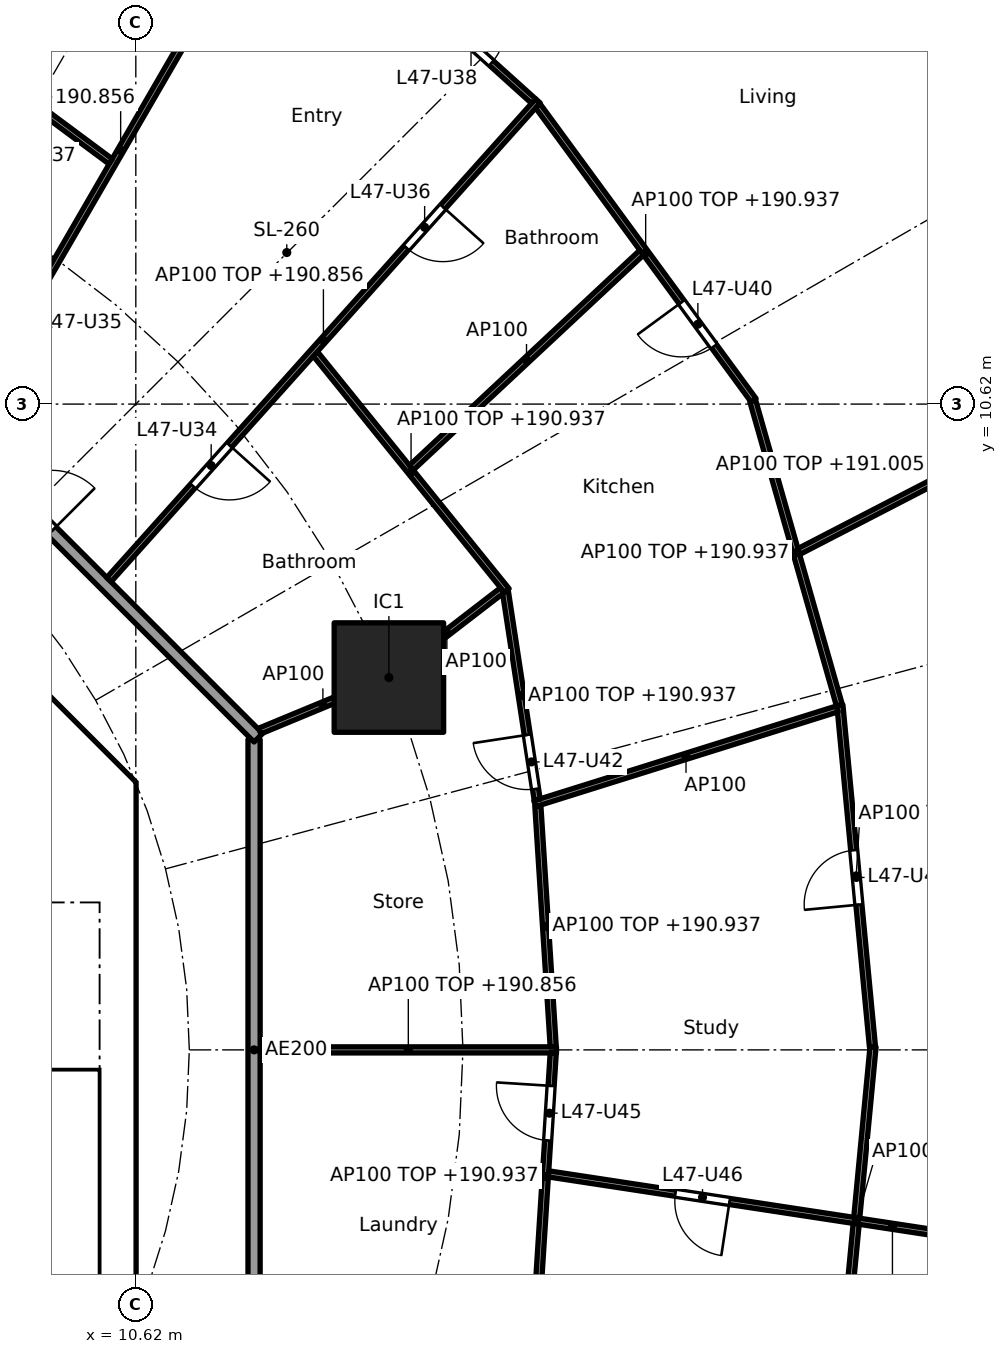
"""IFC4 building model, lengths in metres.
Left out: names, types, materials, properties, quantities, classifications, styles, units other than length and angle.
Written with IfcOpenShell. Run it as: python <this file> out.ifc"""

import sys

from ifc_helpers import new_model, si_unit, direction, frame, frame_2d, origin, origin_2d, place, context, subcontext, project, spatial, polyline, rectangle, outline, extrude, element, fill, save


model = new_model("IFC4")
c1 = context("Model", 3, precision=1e-05, world=origin(), true_north=direction((0.0, 1.0)))
c2 = subcontext(c1, "Body", "Model", "MODEL_VIEW")
j1 = project(units=[si_unit("LENGTHUNIT", "METRE"), si_unit("PLANEANGLEUNIT", "RADIAN")], contexts=[c1])
p1 = place(None, origin())
s1 = spatial("IfcSite", under=j1, at=p1, CompositionType="ELEMENT")
p2 = place(p1, origin())
s2 = spatial("IfcBuilding", under=s1, at=p2, CompositionType="ELEMENT")
p3 = place(p2, frame((0.0, 0.0, 188.1)))
s3 = spatial("IfcBuildingStorey", under=s2, at=p3, CompositionType="ELEMENT", Elevation=188.1)
p4 = place(p3, frame((14.782, 6.123, 0.0), z_axis=(0.0, 0.0, 1.0), x_axis=(1.0, 0.0, 0.0)))
e1 = element("IfcColumn", 1, at=p4, inside=s3, PredefinedType="COLUMN", context=c2, shape_type="SweptSolid", body=[
    extrude(rectangle(XDim=1.8, YDim=1.8, at=origin_2d()), origin(), (0.0, 0.0, 1.0), 3.7),
])
p5 = place(p3, frame((9.988, 4.613, 0.0), z_axis=(0.0, 0.0, 1.0), x_axis=(-0.707106781187, 0.707106781187, 0.0)))
e2 = element("IfcWall", 2, at=p5, inside=s3, PredefinedType="SHEAR", context=c2, shape_type="SweptSolid", body=[
    extrude(rectangle(XDim=7.602, YDim=0.6, at=frame_2d((3.801, 0.0))), origin(), (0.0, 0.0, 1.0), 3.44),
])
p6 = place(p5, frame((3.201, 0.0, 0.0)))
e3 = element("IfcOpeningElement", 3, at=p6, cuts=e2, PredefinedType="OPENING", context=c2, shape_type="SweptSolid", body=[
    extrude(rectangle(XDim=1.2, YDim=2.1, at=frame_2d((0.6, 1.05))), frame((0.0, 0.31, 0.0), z_axis=(0.0, -1.0, 0.0), x_axis=(1.0, 0.0, 0.0)), (0.0, 0.0, 1.0), 0.62),
])
p7 = place(p3, frame((6.7, 4.0, 0.0), z_axis=(0.0, 0.0, 1.0), x_axis=(1.0, 0.0, 0.0)))
e4 = element("IfcWall", 4, at=p7, inside=s3, PredefinedType="SOLIDWALL", context=c2, shape_type="SweptSolid", body=[
    extrude(rectangle(XDim=3.325, YDim=0.2, at=frame_2d((1.662, 0.0))), origin(), (0.0, 0.0, 1.0), 3.44),
])
p8 = place(p7, frame((1.25, 0.0, 0.0)))
e5 = element("IfcOpeningElement", 5, at=p8, cuts=e4, PredefinedType="OPENING", context=c2, shape_type="SweptSolid", body=[
    extrude(rectangle(XDim=1.1, YDim=2.1, at=frame_2d((0.55, 1.05))), frame((0.0, 0.11, 0.0), z_axis=(0.0, -1.0, 0.0), x_axis=(1.0, 0.0, 0.0)), (0.0, 0.0, 1.0), 0.22),
])
p9 = place(p3, origin())
e6 = element("IfcWall", 6, at=p9, inside=s3, PredefinedType="SHEAR", context=c2, shape_type="SweptSolid", body=[
    extrude(outline(polyline([(9.776, -4.401), (10.025, -4.152), (10.025, -3.801), (10.025, 4.152), (9.776, 4.401), (10.2, 4.825), (10.625, 4.401), (10.625, -4.401), (10.2, -4.825), (9.776, -4.401)])), origin(), (0.0, 0.0, 1.0), 3.44),
])
p10 = place(p3, frame((6.138, 14.83, 0.0), z_axis=(0.0, 0.0, 1.0), x_axis=(0.294818517221, 0.955553264818, 0.0)))
e7 = element("IfcWall", 7, at=p10, inside=s3, PredefinedType="PARTITIONING", context=c2, shape_type="SweptSolid", body=[
    extrude(rectangle(XDim=12.619, YDim=0.2, at=frame_2d((6.31, 0.0))), origin(), (0.0, 0.0, 1.0), 2.837),
])
p11 = place(p3, frame((12.565, -5.104, 0.0), z_axis=(0.0, 0.0, 1.0), x_axis=(0.0, 1.0, 0.0)))
e8 = element("IfcWall", 8, at=p11, inside=s3, PredefinedType="PARTITIONING", context=c2, shape_type="SweptSolid", body=[
    extrude(rectangle(XDim=10.209, YDim=0.2, at=frame_2d((5.104, 0.0))), origin(), (0.0, 0.0, 1.0), 3.44),
])
p12 = place(p3, frame((12.635, 5.134, 0.0), z_axis=(0.0, 0.0, 1.0), x_axis=(-0.707106781187, 0.707106781187, 0.0)))
e9 = element("IfcWall", 9, at=p12, inside=s3, PredefinedType="PARTITIONING", context=c2, shape_type="SweptSolid", body=[
    extrude(rectangle(XDim=10.609, YDim=0.2, at=frame_2d((5.305, 0.0))), origin(), (0.0, 0.0, 1.0), 3.44),
])
p13 = place(p12, frame((4.804, 0.0, 0.0)))
e10 = element("IfcOpeningElement", 10, at=p13, cuts=e9, PredefinedType="OPENING", context=c2, shape_type="SweptSolid", body=[
    extrude(rectangle(XDim=1.0, YDim=2.1, at=frame_2d((0.5, 1.05))), frame((0.0, 0.11, 0.0), z_axis=(0.0, -1.0, 0.0), x_axis=(1.0, 0.0, 0.0)), (0.0, 0.0, 1.0), 0.22),
])
p14 = place(p3, frame((12.665, 0.0, 0.0), z_axis=(0.0, 0.0, 1.0), x_axis=(1.0, 0.0, 0.0)))
e11 = element("IfcWall", 11, at=p14, inside=s3, PredefinedType="PARTITIONING", context=c2, shape_type="SweptSolid", body=[
    extrude(rectangle(XDim=4.873, YDim=0.1, at=frame_2d((2.437, 0.0))), origin(), (0.0, 0.0, 1.0), 2.756),
])
p15 = place(p3, frame((17.485, 0.05, 0.0), z_axis=(0.0, 0.0, 1.0), x_axis=(-0.063679314345, 0.99797041285, 0.0)))
e12 = element("IfcWall", 12, at=p15, inside=s3, PredefinedType="PARTITIONING", context=c2, shape_type="SweptSolid", body=[
    extrude(rectangle(XDim=3.972, YDim=0.1, at=frame_2d((1.986, 0.0))), origin(), (0.0, 0.0, 1.0), 2.837),
])
p16 = place(p3, frame((17.485, -0.05, 0.0), z_axis=(0.0, 0.0, 1.0), x_axis=(-0.063673473968, -0.997970785501, 0.0)))
e13 = element("IfcWall", 13, at=p16, inside=s3, PredefinedType="PARTITIONING", context=c2, shape_type="SweptSolid", body=[
    extrude(rectangle(XDim=4.072, YDim=0.1, at=frame_2d((2.036, 0.0))), origin(), (0.0, 0.0, 1.0), 2.837),
])
p17 = place(p16, frame((0.543, 0.0, 0.0)))
e14 = element("IfcOpeningElement", 14, at=p17, cuts=e13, PredefinedType="OPENING", context=c2, shape_type="SweptSolid", body=[
    extrude(rectangle(XDim=0.9, YDim=2.1, at=frame_2d((0.45, 1.05))), frame((0.0, 0.06, 0.0), z_axis=(0.0, -1.0, 0.0), x_axis=(1.0, 0.0, 0.0)), (0.0, 0.0, 1.0), 0.12),
])
p18 = place(p3, frame((22.734, 0.05, 0.0), z_axis=(0.0, 0.0, 1.0), x_axis=(-0.0949274088, 0.995484197292, 0.0)))
e15 = element("IfcWall", 15, at=p18, inside=s3, PredefinedType="PARTITIONING", context=c2, shape_type="SweptSolid", body=[
    extrude(rectangle(XDim=5.648, YDim=0.1, at=frame_2d((2.824, 0.0))), origin(), (0.0, 0.0, 1.0), 2.837),
])
p19 = place(p18, frame((2.349, 0.0, 0.0)))
e16 = element("IfcOpeningElement", 16, at=p19, cuts=e15, PredefinedType="OPENING", context=c2, shape_type="SweptSolid", body=[
    extrude(rectangle(XDim=0.9, YDim=2.1, at=frame_2d((0.45, 1.05))), frame((0.0, 0.06, 0.0), z_axis=(0.0, -1.0, 0.0), x_axis=(1.0, 0.0, 0.0)), (0.0, 0.0, 1.0), 0.12),
])
p20 = place(p3, frame((22.744, 0.05, 0.0), z_axis=(0.0, 0.0, 1.0), x_axis=(-0.094931362305, -0.995483820286, 0.0)))
e17 = element("IfcWall", 17, at=p20, inside=s3, PredefinedType="PARTITIONING", context=c2, shape_type="SweptSolid", body=[
    extrude(rectangle(XDim=5.748, YDim=0.1, at=frame_2d((2.874, 0.0))), origin(), (0.0, 0.0, 1.0), 2.837),
])
p21 = place(p3, frame((17.181, 4.049, 0.0), z_axis=(0.0, 0.0, 1.0), x_axis=(0.954246359918, 0.299021545351, 0.0)))
e18 = element("IfcWall", 18, at=p21, inside=s3, PredefinedType="PARTITIONING", context=c2, shape_type="SweptSolid", body=[
    extrude(rectangle(XDim=5.213, YDim=0.1, at=frame_2d((2.606, 0.0))), origin(), (0.0, 0.0, 1.0), 3.44),
])
p22 = place(p3, frame((17.221, 4.113, 0.0), z_axis=(0.0, 0.0, 1.0), x_axis=(-0.151078880423, 0.988521710379, 0.0)))
e19 = element("IfcWall", 19, at=p22, inside=s3, PredefinedType="PARTITIONING", context=c2, shape_type="SweptSolid", body=[
    extrude(rectangle(XDim=3.469, YDim=0.1, at=frame_2d((1.735, 0.0))), origin(), (0.0, 0.0, 1.0), 2.837),
])
p23 = place(p22, frame((0.18, 0.0, 0.0)))
e20 = element("IfcOpeningElement", 20, at=p23, cuts=e19, PredefinedType="OPENING", context=c2, shape_type="SweptSolid", body=[
    extrude(rectangle(XDim=0.9, YDim=2.1, at=frame_2d((0.45, 1.05))), frame((0.0, 0.06, 0.0), z_axis=(0.0, -1.0, 0.0), x_axis=(1.0, 0.0, 0.0)), (0.0, 0.0, 1.0), 0.12),
])
p24 = place(p3, frame((22.189, 5.67, 0.0), z_axis=(0.0, 0.0, 1.0), x_axis=(-0.273815967041, 0.961782104322, 0.0)))
e21 = element("IfcWall", 21, at=p24, inside=s3, PredefinedType="PARTITIONING", context=c2, shape_type="SweptSolid", body=[
    extrude(rectangle(XDim=5.202, YDim=0.1, at=frame_2d((2.601, 0.0))), origin(), (0.0, 0.0, 1.0), 2.837),
])
p25 = place(p3, frame((21.522, 8.195, 0.0), z_axis=(0.0, 0.0, 1.0), x_axis=(0.888281046031, 0.459300319249, 0.0)))
e22 = element("IfcWall", 22, at=p25, inside=s3, PredefinedType="PARTITIONING", context=c2, shape_type="SweptSolid", body=[
    extrude(rectangle(XDim=6.176, YDim=0.1, at=frame_2d((3.088, 0.0))), origin(), (0.0, 0.0, 1.0), 2.905),
])
p26 = place(p25, frame((2.638, 0.0, 0.0)))
e23 = element("IfcOpeningElement", 23, at=p26, cuts=e22, PredefinedType="OPENING", context=c2, shape_type="SweptSolid", body=[
    extrude(rectangle(XDim=0.9, YDim=2.1, at=frame_2d((0.45, 1.05))), frame((0.0, 0.06, 0.0), z_axis=(0.0, -1.0, 0.0), x_axis=(1.0, 0.0, 0.0)), (0.0, 0.0, 1.0), 0.12),
])
p27 = place(p3, frame((12.657, 5.243, 0.0), z_axis=(0.0, 0.0, 1.0), x_axis=(0.923826362943, 0.382811769845, 0.0)))
e24 = element("IfcWall", 24, at=p27, inside=s3, PredefinedType="PARTITIONING", context=c2, shape_type="SweptSolid", body=[
    extrude(rectangle(XDim=2.25, YDim=0.1, at=frame_2d((1.125, 0.0))), origin(), (0.0, 0.0, 1.0), 3.44),
])
p28 = place(p3, frame((14.822, 6.154, 0.0), z_axis=(0.0, 0.0, 1.0), x_axis=(0.792226528082, 0.610227111987, 0.0)))
e25 = element("IfcWall", 25, at=p28, inside=s3, PredefinedType="PARTITIONING", context=c2, shape_type="SweptSolid", body=[
    extrude(rectangle(XDim=2.307, YDim=0.1, at=frame_2d((1.154, 0.0))), origin(), (0.0, 0.0, 1.0), 3.44),
])
p29 = place(p3, frame((16.721, 7.553, 0.0), z_axis=(0.0, 0.0, 1.0), x_axis=(-0.628753513808, 0.777604667472, 0.0)))
e26 = element("IfcWall", 26, at=p29, inside=s3, PredefinedType="PARTITIONING", context=c2, shape_type="SweptSolid", body=[
    extrude(rectangle(XDim=5.007, YDim=0.1, at=frame_2d((2.504, 0.0))), origin(), (0.0, 0.0, 1.0), 2.837),
])
p30 = place(p3, frame((20.781, 10.681, 0.0), z_axis=(0.0, 0.0, 1.0), x_axis=(-0.591117075283, 0.806585769345, 0.0)))
e27 = element("IfcWall", 27, at=p30, inside=s3, PredefinedType="PARTITIONING", context=c2, shape_type="SweptSolid", body=[
    extrude(rectangle(XDim=6.01, YDim=0.1, at=frame_2d((3.005, 0.0))), origin(), (0.0, 0.0, 1.0), 2.837),
])
p31 = place(p30, frame((1.103, 0.0, 0.0)))
e28 = element("IfcOpeningElement", 28, at=p31, cuts=e27, PredefinedType="OPENING", context=c2, shape_type="SweptSolid", body=[
    extrude(rectangle(XDim=0.9, YDim=2.1, at=frame_2d((0.45, 1.05))), frame((0.0, 0.06, 0.0), z_axis=(0.0, -1.0, 0.0), x_axis=(1.0, 0.0, 0.0)), (0.0, 0.0, 1.0), 0.12),
])
p32 = place(p3, frame((15.152, 9.573, 0.0), z_axis=(0.0, 0.0, 1.0), x_axis=(0.730723083214, 0.682673989294, 0.0)))
e29 = element("IfcWall", 29, at=p32, inside=s3, PredefinedType="PARTITIONING", context=c2, shape_type="SweptSolid", body=[
    extrude(rectangle(XDim=5.183, YDim=0.1, at=frame_2d((2.591, 0.0))), origin(), (0.0, 0.0, 1.0), 3.44),
])
p33 = place(p3, frame((10.178, 7.732, 0.0), z_axis=(0.0, 0.0, 1.0), x_axis=(0.667280084362, 0.744806880348, 0.0)))
e30 = element("IfcWall", 30, at=p33, inside=s3, PredefinedType="PARTITIONING", context=c2, shape_type="SweptSolid", body=[
    extrude(rectangle(XDim=10.572, YDim=0.1, at=frame_2d((5.286, 0.0))), origin(), (0.0, 0.0, 1.0), 2.756),
])
p34 = place(p33, frame((2.07, 0.0, 0.0)))
e31 = element("IfcOpeningElement", 31, at=p34, cuts=e30, PredefinedType="OPENING", context=c2, shape_type="SweptSolid", body=[
    extrude(rectangle(XDim=0.9, YDim=2.1, at=frame_2d((0.45, 1.05))), frame((0.0, 0.06, 0.0), z_axis=(0.0, -1.0, 0.0), x_axis=(1.0, 0.0, 0.0)), (0.0, 0.0, 1.0), 0.12),
])
p35 = place(p33, frame((7.331, 0.0, 0.0)))
e32 = element("IfcOpeningElement", 32, at=p35, cuts=e30, PredefinedType="OPENING", context=c2, shape_type="SweptSolid", body=[
    extrude(rectangle(XDim=0.9, YDim=2.1, at=frame_2d((0.45, 1.05))), frame((0.0, 0.06, 0.0), z_axis=(0.0, -1.0, 0.0), x_axis=(1.0, 0.0, 0.0)), (0.0, 0.0, 1.0), 0.12),
])
p36 = place(p3, frame((17.162, 15.603, 0.0), z_axis=(0.0, 0.0, 1.0), x_axis=(-0.742790086539, 0.66952437397, 0.0)))
e33 = element("IfcWall", 33, at=p36, inside=s3, PredefinedType="PARTITIONING", context=c2, shape_type="SweptSolid", body=[
    extrude(rectangle(XDim=5.542, YDim=0.1, at=frame_2d((2.771, 0.0))), origin(), (0.0, 0.0, 1.0), 2.837),
])
p37 = place(p36, frame((0.935, 0.0, 0.0)))
e34 = element("IfcOpeningElement", 34, at=p37, cuts=e33, PredefinedType="OPENING", context=c2, shape_type="SweptSolid", body=[
    extrude(rectangle(XDim=0.9, YDim=2.1, at=frame_2d((0.45, 1.05))), frame((0.0, 0.06, 0.0), z_axis=(0.0, -1.0, 0.0), x_axis=(1.0, 0.0, 0.0)), (0.0, 0.0, 1.0), 0.12),
])
p38 = place(p3, frame((7.708, 10.198, 0.0), z_axis=(0.0, 0.0, 1.0), x_axis=(0.501288100085, 0.865280440501, 0.0)))
e35 = element("IfcWall", 35, at=p38, inside=s3, PredefinedType="PARTITIONING", context=c2, shape_type="SweptSolid", body=[
    extrude(rectangle(XDim=10.623, YDim=0.1, at=frame_2d((5.312, 0.0))), origin(), (0.0, 0.0, 1.0), 2.756),
])
p39 = place(p38, frame((2.082, 0.0, 0.0)))
e36 = element("IfcOpeningElement", 36, at=p39, cuts=e35, PredefinedType="OPENING", context=c2, shape_type="SweptSolid", body=[
    extrude(rectangle(XDim=0.9, YDim=2.1, at=frame_2d((0.45, 1.05))), frame((0.0, 0.06, 0.0), z_axis=(0.0, -1.0, 0.0), x_axis=(1.0, 0.0, 0.0)), (0.0, 0.0, 1.0), 0.12),
])
p40 = place(p38, frame((7.369, 0.0, 0.0)))
e37 = element("IfcOpeningElement", 37, at=p40, cuts=e35, PredefinedType="OPENING", context=c2, shape_type="SweptSolid", body=[
    extrude(rectangle(XDim=0.9, YDim=2.1, at=frame_2d((0.45, 1.05))), frame((0.0, 0.06, 0.0), z_axis=(0.0, -1.0, 0.0), x_axis=(1.0, 0.0, 0.0)), (0.0, 0.0, 1.0), 0.12),
])
p41 = place(p3, frame((10.207, 14.61, 0.0), z_axis=(0.0, 0.0, 1.0), x_axis=(-0.802769141821, 0.596289950394, 0.0)))
e38 = element("IfcWall", 38, at=p41, inside=s3, PredefinedType="PARTITIONING", context=c2, shape_type="SweptSolid", body=[
    extrude(rectangle(XDim=4.092, YDim=0.1, at=frame_2d((2.046, 0.0))), origin(), (0.0, 0.0, 1.0), 2.837),
])
p42 = place(p3, frame((17.407, -2.039, 0.0), z_axis=(0.0, 0.0, 1.0), x_axis=(0.98858728603, -0.150649188184, 0.0)))
e39 = element("IfcWall", 39, at=p42, inside=s3, PredefinedType="PARTITIONING", context=c2, shape_type="SweptSolid", body=[
    extrude(rectangle(XDim=11.441, YDim=0.1, at=frame_2d((5.721, 0.0))), origin(), (0.0, 0.0, 1.0), 2.905),
])
p43 = place(p42, frame((7.832, 0.0, 0.0)))
e40 = element("IfcOpeningElement", 40, at=p43, cuts=e39, PredefinedType="OPENING", context=c2, shape_type="SweptSolid", body=[
    extrude(rectangle(XDim=0.9, YDim=2.1, at=frame_2d((0.45, 1.05))), frame((0.0, 0.06, 0.0), z_axis=(0.0, -1.0, 0.0), x_axis=(1.0, 0.0, 0.0)), (0.0, 0.0, 1.0), 0.12),
])
p44 = place(p42, frame((2.111, 0.0, 0.0)))
e41 = element("IfcOpeningElement", 41, at=p44, cuts=e39, PredefinedType="OPENING", context=c2, shape_type="SweptSolid", body=[
    extrude(rectangle(XDim=0.9, YDim=2.1, at=frame_2d((0.45, 1.05))), frame((0.0, 0.06, 0.0), z_axis=(0.0, -1.0, 0.0), x_axis=(1.0, 0.0, 0.0)), (0.0, 0.0, 1.0), 0.12),
])
p45 = place(p13, frame((1.0, 0.0, 0.0), x_axis=(-1.0, 0.0, 0.0)))
e42 = element("IfcDoor", 42, at=p45, inside=s3, OperationType="SINGLE_SWING_RIGHT", PredefinedType="DOOR", context=c2, shape_type="SweptSolid", body=[
    extrude(rectangle(XDim=1.0, YDim=2.1, at=frame_2d((0.5, 1.05))), frame((0.0, 0.025, 0.0), z_axis=(0.0, -1.0, 0.0), x_axis=(1.0, 0.0, 0.0)), (0.0, 0.0, 1.0), 0.05),
])
fill(e10, e42)
p46 = place(p34, frame((0.9, 0.0, 0.0), x_axis=(-1.0, 0.0, 0.0)))
e43 = element("IfcDoor", 43, at=p46, inside=s3, OperationType="SINGLE_SWING_LEFT", PredefinedType="DOOR", context=c2, shape_type="SweptSolid", body=[
    extrude(rectangle(XDim=0.9, YDim=2.1, at=frame_2d((0.45, 1.05))), frame((0.0, 0.025, 0.0), z_axis=(0.0, -1.0, 0.0), x_axis=(1.0, 0.0, 0.0)), (0.0, 0.0, 1.0), 0.05),
])
fill(e31, e43)
p47 = place(p35, frame((0.9, 0.0, 0.0), x_axis=(-1.0, 0.0, 0.0)))
e44 = element("IfcDoor", 44, at=p47, inside=s3, OperationType="SINGLE_SWING_LEFT", PredefinedType="DOOR", context=c2, shape_type="SweptSolid", body=[
    extrude(rectangle(XDim=0.9, YDim=2.1, at=frame_2d((0.45, 1.05))), frame((0.0, 0.025, 0.0), z_axis=(0.0, -1.0, 0.0), x_axis=(1.0, 0.0, 0.0)), (0.0, 0.0, 1.0), 0.05),
])
fill(e32, e44)
p48 = place(p37, frame((0.9, 0.0, 0.0), x_axis=(-1.0, 0.0, 0.0)))
e45 = element("IfcDoor", 45, at=p48, inside=s3, OperationType="SINGLE_SWING_LEFT", PredefinedType="DOOR", context=c2, shape_type="SweptSolid", body=[
    extrude(rectangle(XDim=0.9, YDim=2.1, at=frame_2d((0.45, 1.05))), frame((0.0, 0.025, 0.0), z_axis=(0.0, -1.0, 0.0), x_axis=(1.0, 0.0, 0.0)), (0.0, 0.0, 1.0), 0.05),
])
fill(e34, e45)
p49 = place(p31, origin())
e46 = element("IfcDoor", 46, at=p49, inside=s3, OperationType="SINGLE_SWING_RIGHT", PredefinedType="DOOR", context=c2, shape_type="SweptSolid", body=[
    extrude(rectangle(XDim=0.9, YDim=2.1, at=frame_2d((0.45, 1.05))), frame((0.0, 0.025, 0.0), z_axis=(0.0, -1.0, 0.0), x_axis=(1.0, 0.0, 0.0)), (0.0, 0.0, 1.0), 0.05),
])
fill(e28, e46)
p50 = place(p23, origin())
e47 = element("IfcDoor", 47, at=p50, inside=s3, OperationType="SINGLE_SWING_RIGHT", PredefinedType="DOOR", context=c2, shape_type="SweptSolid", body=[
    extrude(rectangle(XDim=0.9, YDim=2.1, at=frame_2d((0.45, 1.05))), frame((0.0, 0.025, 0.0), z_axis=(0.0, -1.0, 0.0), x_axis=(1.0, 0.0, 0.0)), (0.0, 0.0, 1.0), 0.05),
])
fill(e20, e47)
p51 = place(p19, origin())
e48 = element("IfcDoor", 48, at=p51, inside=s3, OperationType="SINGLE_SWING_LEFT", PredefinedType="DOOR", context=c2, shape_type="SweptSolid", body=[
    extrude(rectangle(XDim=0.9, YDim=2.1, at=frame_2d((0.45, 1.05))), frame((0.0, 0.025, 0.0), z_axis=(0.0, -1.0, 0.0), x_axis=(1.0, 0.0, 0.0)), (0.0, 0.0, 1.0), 0.05),
])
fill(e16, e48)
p52 = place(p17, frame((0.9, 0.0, 0.0), x_axis=(-1.0, 0.0, 0.0)))
e49 = element("IfcDoor", 49, at=p52, inside=s3, OperationType="SINGLE_SWING_RIGHT", PredefinedType="DOOR", context=c2, shape_type="SweptSolid", body=[
    extrude(rectangle(XDim=0.9, YDim=2.1, at=frame_2d((0.45, 1.05))), frame((0.0, 0.025, 0.0), z_axis=(0.0, -1.0, 0.0), x_axis=(1.0, 0.0, 0.0)), (0.0, 0.0, 1.0), 0.05),
])
fill(e14, e49)
p53 = place(p44, frame((0.9, 0.0, 0.0), x_axis=(-1.0, 0.0, 0.0)))
e50 = element("IfcDoor", 50, at=p53, inside=s3, OperationType="SINGLE_SWING_LEFT", PredefinedType="DOOR", context=c2, shape_type="SweptSolid", body=[
    extrude(rectangle(XDim=0.9, YDim=2.1, at=frame_2d((0.45, 1.05))), frame((0.0, 0.025, 0.0), z_axis=(0.0, -1.0, 0.0), x_axis=(1.0, 0.0, 0.0)), (0.0, 0.0, 1.0), 0.05),
])
fill(e41, e50)
save(model, sys.argv[1])
